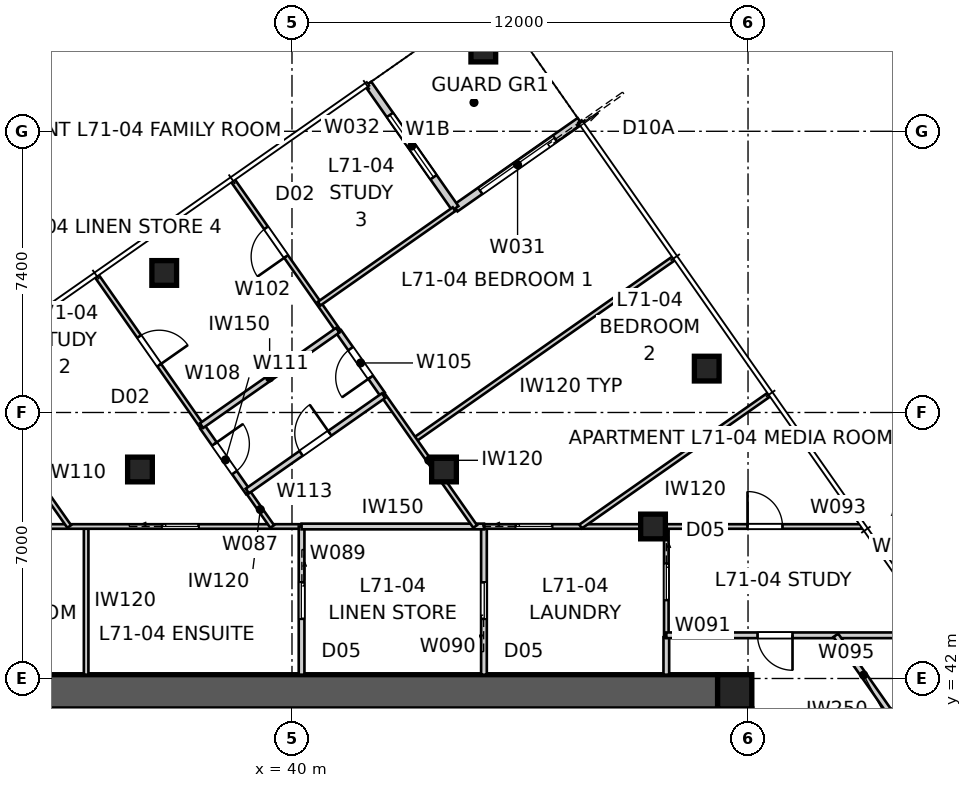
"""IFC4 building model, lengths in metres.
Left out: names, types, materials, properties, quantities, classifications, styles, units other than length and angle.
Written with IfcOpenShell. Run it as: python <this file> out.ifc"""

import sys

from ifc_helpers import new_model, si_unit, direction, frame, frame_2d, origin, origin_2d, place, context, subcontext, project, spatial, polyline, rectangle, outline, extrude, element, fill, save


model = new_model("IFC4")
c1 = context("Model", 3, precision=1e-05, world=origin(), true_north=direction((0.0, 1.0)))
c2 = subcontext(c1, "Body", "Model", "MODEL_VIEW")
j1 = project(units=[si_unit("LENGTHUNIT", "METRE"), si_unit("PLANEANGLEUNIT", "RADIAN")], contexts=[c1])
p1 = place(None, origin())
s1 = spatial("IfcSite", under=j1, at=p1, CompositionType="ELEMENT")
p2 = place(p1, origin())
s2 = spatial("IfcBuilding", under=s1, at=p2, CompositionType="ELEMENT")
p3 = place(p2, frame((0.0, 0.0, 257.4)))
s3 = spatial("IfcBuildingStorey", under=s2, at=p3, CompositionType="ELEMENT", Elevation=257.4)
p4 = place(p3, frame((28.8, 41.65, 0.0), z_axis=(0.0, 0.0, 1.0), x_axis=(1.0, 0.0, 0.0)))
e1 = element("IfcWall", 1, at=p4, inside=s3, PredefinedType="SHEAR", context=c2, shape_type="SweptSolid", body=[
    extrude(outline(polyline([(0.0, -0.45), (22.4, -0.45), (22.4, -0.025), (22.85, -0.025), (22.85, 0.025), (22.4, 0.025), (22.4, 0.45), (0.0, 0.45), (0.0, 0.025), (-0.45, 0.025), (-0.45, -0.025), (0.0, -0.025), (0.0, -0.45)])), origin(), (0.0, 0.0, 1.0), 3.4),
])
p5 = place(p3, frame((51.65, 18.8, 0.0), z_axis=(0.0, 0.0, 1.0), x_axis=(0.0, 1.0, 0.0)))
e2 = element("IfcWall", 2, at=p5, inside=s3, PredefinedType="SHEAR", context=c2, shape_type="SweptSolid", body=[
    extrude(outline(polyline([(0.0, -0.45), (22.4, -0.45), (22.4, -0.025), (22.85, -0.025), (22.85, 0.025), (22.4, 0.025), (22.4, 0.45), (0.0, 0.45), (0.0, 0.025), (-0.45, 0.025), (-0.45, -0.025), (0.0, -0.025), (0.0, -0.45)])), origin(), (0.0, 0.0, 1.0), 3.4),
])
p6 = place(p5, frame((11.14, 0.0, 0.0)))
e3 = element("IfcOpeningElement", 3, at=p6, cuts=e2, PredefinedType="OPENING", context=c2, shape_type="SweptSolid", body=[
    extrude(rectangle(XDim=1.02, YDim=2.4, at=frame_2d((0.51, 1.2))), frame((0.0, 0.46, 0.0), z_axis=(0.0, -1.0, 0.0), x_axis=(1.0, 0.0, 0.0)), (0.0, 0.0, 1.0), 0.92),
])
p7 = place(p3, frame((51.65, 41.65, 0.0), z_axis=(0.0, 0.0, 1.0), x_axis=(1.0, 0.0, 0.0)))
e4 = element("IfcColumn", 4, at=p7, inside=s3, PredefinedType="COLUMN", context=c2, shape_type="SweptSolid", body=[
    extrude(rectangle(XDim=0.9, YDim=0.9, at=origin_2d()), origin(), (0.0, 0.0, 1.0), 3.4),
])
for number, where, z_axis, x_axis in (
    (5, (50.914, 50.155, 0.0), (0.0, 0.0, 1.0), (1.0, 0.0, 0.0)),
    (6, (45.034, 58.551, 0.0), (0.0, 0.0, 1.0), (1.0, 0.0, 0.0)),
    (7, (36.638, 52.672, 0.0), (0.0, 0.0, 1.0), (1.0, 0.0, 0.0)),
    (8, (49.5, 46.0, 0.0), (0.0, 0.0, 1.0), (1.0, 0.0, 0.0)),
    (9, (44.0, 47.5, 0.0), (0.0, 0.0, 1.0), (1.0, 0.0, 0.0)),
    (10, (36.0, 47.5, 0.0), (0.0, 0.0, 1.0), (1.0, 0.0, 0.0)),
):
    element("IfcColumn", number, at=place(p3, frame(where, z_axis=z_axis, x_axis=x_axis)), inside=s3, PredefinedType="COLUMN", context=c2, shape_type="SweptSolid", body=[
        extrude(rectangle(XDim=0.65, YDim=0.65, at=origin_2d()), origin(), (0.0, 0.0, 1.0), 3.4),
    ])
p8 = place(p3, frame((47.574, 56.667, 0.0), z_axis=(0.0, 0.0, 1.0), x_axis=(-0.819165963305, -0.573556557423, 0.0)))
e11 = element("IfcWall", 11, at=p8, inside=s3, PredefinedType="SOLIDWALL", context=c2, shape_type="SweptSolid", body=[
    extrude(rectangle(XDim=4.0, YDim=0.2, at=frame_2d((2.0, 0.0))), origin(), (0.0, 0.0, 1.0), 3.25),
])
p9 = place(p8, frame((0.8, 0.0, 0.0)))
e12 = element("IfcOpeningElement", 12, at=p9, cuts=e11, PredefinedType="OPENING", context=c2, shape_type="SweptSolid", body=[
    extrude(rectangle(XDim=2.4, YDim=2.1, at=frame_2d((1.2, 1.05))), frame((0.0, 0.11, 0.0), z_axis=(0.0, -1.0, 0.0), x_axis=(1.0, 0.0, 0.0)), (0.0, 0.0, 1.0), 0.22),
])
p10 = place(p3, frame((44.298, 54.373, 0.0), z_axis=(0.0, 0.0, 1.0), x_axis=(-0.573597512525, 0.819137286189, 0.0)))
e13 = element("IfcWall", 13, at=p10, inside=s3, PredefinedType="SOLIDWALL", context=c2, shape_type="SweptSolid", body=[
    extrude(rectangle(XDim=4.0, YDim=0.2, at=frame_2d((2.0, 0.0))), origin(), (0.0, 0.0, 1.0), 3.25),
])
p11 = place(p10, frame((1.0, 0.0, 0.45)))
e14 = element("IfcOpeningElement", 14, at=p11, cuts=e13, PredefinedType="OPENING", context=c2, shape_type="SweptSolid", body=[
    extrude(rectangle(XDim=2.0, YDim=1.8, at=frame_2d((1.0, 0.9))), frame((0.0, 0.11, 0.0), z_axis=(0.0, -1.0, 0.0), x_axis=(1.0, 0.0, 0.0)), (0.0, 0.0, 1.0), 0.22),
])
p12 = place(p3, frame((57.612, 42.332, 0.0), z_axis=(0.0, 0.0, 1.0), x_axis=(-0.819161528122, -0.573562891796, 0.0)))
e15 = element("IfcWall", 15, at=p12, inside=s3, PredefinedType="PARTITIONING", context=c2, shape_type="SweptSolid", body=[
    extrude(rectangle(XDim=6.681, YDim=0.25, at=frame_2d((3.341, 0.0))), origin(), (0.0, 0.0, 1.0), 3.25),
])
p13 = place(p3, frame((34.583, 46.0, 0.0), z_axis=(0.0, 0.0, 1.0), x_axis=(0.0, -1.0, 0.0)))
e16 = element("IfcWall", 16, at=p13, inside=s3, PredefinedType="PARTITIONING", context=c2, shape_type="SweptSolid", body=[
    extrude(rectangle(XDim=3.9, YDim=0.12, at=frame_2d((1.95, 0.0))), origin(), (0.0, 0.0, 1.0), 3.25),
])
p14 = place(p3, frame((29.219, 46.0, 0.0), z_axis=(0.0, 0.0, 1.0), x_axis=(1.0, 0.0, 0.0)))
e17 = element("IfcWall", 17, at=p14, inside=s3, PredefinedType="PARTITIONING", context=c2, shape_type="SweptSolid", body=[
    extrude(rectangle(XDim=11.034, YDim=0.12, at=frame_2d((5.517, 0.0))), origin(), (0.0, 0.0, 1.0), 2.55),
])
p15 = place(p14, frame((2.01, 0.0, 0.0)))
e18 = element("IfcOpeningElement", 18, at=p15, cuts=e17, PredefinedType="OPENING", context=c2, shape_type="SweptSolid", body=[
    extrude(rectangle(XDim=0.96, YDim=2.1, at=frame_2d((0.48, 1.05))), frame((0.0, 0.07, 0.0), z_axis=(0.0, -1.0, 0.0), x_axis=(1.0, 0.0, 0.0)), (0.0, 0.0, 1.0), 0.14),
])
p16 = place(p14, frame((7.363, 0.0, 0.0)))
e19 = element("IfcOpeningElement", 19, at=p16, cuts=e17, PredefinedType="OPENING", context=c2, shape_type="SweptSolid", body=[
    extrude(rectangle(XDim=0.96, YDim=2.1, at=frame_2d((0.48, 1.05))), frame((0.0, 0.07, 0.0), z_axis=(0.0, -1.0, 0.0), x_axis=(1.0, 0.0, 0.0)), (0.0, 0.0, 1.0), 0.14),
])
p17 = place(p3, frame((40.253, 46.0, 0.0), z_axis=(0.0, 0.0, 1.0), x_axis=(0.0, -1.0, 0.0)))
e20 = element("IfcWall", 20, at=p17, inside=s3, PredefinedType="SOLIDWALL", context=c2, shape_type="SweptSolid", body=[
    extrude(rectangle(XDim=3.9, YDim=0.15, at=frame_2d((1.95, 0.0))), origin(), (0.0, 0.0, 1.0), 3.25),
])
p18 = place(p17, frame((1.47, 0.0, 0.0)))
e21 = element("IfcOpeningElement", 21, at=p18, cuts=e20, PredefinedType="OPENING", context=c2, shape_type="SweptSolid", body=[
    extrude(rectangle(XDim=0.96, YDim=2.1, at=frame_2d((0.48, 1.05))), frame((0.0, 0.085, 0.0), z_axis=(0.0, -1.0, 0.0), x_axis=(1.0, 0.0, 0.0)), (0.0, 0.0, 1.0), 0.17),
])
p19 = place(p3, frame((45.051, 42.1, 0.0), z_axis=(0.0, 0.0, 1.0), x_axis=(0.0, 1.0, 0.0)))
e22 = element("IfcWall", 22, at=p19, inside=s3, PredefinedType="SOLIDWALL", context=c2, shape_type="SweptSolid", body=[
    extrude(rectangle(XDim=3.9, YDim=0.15, at=frame_2d((1.95, 0.0))), origin(), (0.0, 0.0, 1.0), 3.25),
])
p20 = place(p19, frame((1.47, 0.0, 0.0)))
e23 = element("IfcOpeningElement", 23, at=p20, cuts=e22, PredefinedType="OPENING", context=c2, shape_type="SweptSolid", body=[
    extrude(rectangle(XDim=0.96, YDim=2.1, at=frame_2d((0.48, 1.05))), frame((0.0, 0.085, 0.0), z_axis=(0.0, -1.0, 0.0), x_axis=(1.0, 0.0, 0.0)), (0.0, 0.0, 1.0), 0.17),
])
p21 = place(p3, frame((49.85, 46.0, 0.0), z_axis=(0.0, 0.0, 1.0), x_axis=(0.0, -1.0, 0.0)))
e24 = element("IfcWall", 24, at=p21, inside=s3, PredefinedType="PARTITIONING", context=c2, shape_type="SweptSolid", body=[
    extrude(rectangle(XDim=2.913, YDim=0.12, at=frame_2d((1.457, 0.0))), origin(), (0.0, 0.0, 1.0), 3.25),
])
p22 = place(p21, frame((0.977, 0.0, 0.0)))
e25 = element("IfcOpeningElement", 25, at=p22, cuts=e24, PredefinedType="OPENING", context=c2, shape_type="SweptSolid", body=[
    extrude(rectangle(XDim=0.96, YDim=2.1, at=frame_2d((0.48, 1.05))), frame((0.0, 0.07, 0.0), z_axis=(0.0, -1.0, 0.0), x_axis=(1.0, 0.0, 0.0)), (0.0, 0.0, 1.0), 0.14),
])
p23 = place(p3, frame((49.85, 43.087, 0.0), z_axis=(0.0, 0.0, 1.0), x_axis=(0.0, -1.0, 0.0)))
e26 = element("IfcWall", 26, at=p23, inside=s3, PredefinedType="SOLIDWALL", context=c2, shape_type="SweptSolid", body=[
    extrude(rectangle(XDim=0.987, YDim=0.15, at=frame_2d((0.493, 0.0))), origin(), (0.0, 0.0, 1.0), 3.25),
])
p24 = place(p3, frame((45.051, 46.0, 0.0), z_axis=(0.0, 0.0, 1.0), x_axis=(1.0, 0.0, 0.0)))
e27 = element("IfcWall", 27, at=p24, inside=s3, PredefinedType="PARTITIONING", context=c2, shape_type="SweptSolid", body=[
    extrude(rectangle(XDim=9.943, YDim=0.12, at=frame_2d((4.972, 0.0))), origin(), (0.0, 0.0, 1.0), 2.55),
])
p25 = place(p24, frame((0.835, 0.0, 0.0)))
e28 = element("IfcOpeningElement", 28, at=p25, cuts=e27, PredefinedType="OPENING", context=c2, shape_type="SweptSolid", body=[
    extrude(rectangle(XDim=0.96, YDim=2.1, at=frame_2d((0.48, 1.05))), frame((0.0, 0.07, 0.0), z_axis=(0.0, -1.0, 0.0), x_axis=(1.0, 0.0, 0.0)), (0.0, 0.0, 1.0), 0.14),
])
p26 = place(p24, frame((6.935, 0.0, 0.0)))
e29 = element("IfcOpeningElement", 29, at=p26, cuts=e27, PredefinedType="OPENING", context=c2, shape_type="SweptSolid", body=[
    extrude(rectangle(XDim=0.92, YDim=2.34, at=frame_2d((0.46, 1.17))), frame((0.0, 0.07, 0.0), z_axis=(0.0, -1.0, 0.0), x_axis=(1.0, 0.0, 0.0)), (0.0, 0.0, 1.0), 0.14),
])
p27 = place(p3, frame((40.253, 46.0, 0.0), z_axis=(0.0, 0.0, 1.0), x_axis=(1.0, 0.0, 0.0)))
e30 = element("IfcWall", 30, at=p27, inside=s3, PredefinedType="SOLIDWALL", context=c2, shape_type="SweptSolid", body=[
    extrude(rectangle(XDim=4.799, YDim=0.15, at=frame_2d((2.399, 0.0))), origin(), (0.0, 0.0, 1.0), 3.25),
])
p28 = place(p3, frame((56.0, 43.137, 0.0), z_axis=(0.0, 0.0, 1.0), x_axis=(-1.0, 0.0, 0.0)))
e31 = element("IfcWall", 31, at=p28, inside=s3, PredefinedType="SOLIDWALL", context=c2, shape_type="SweptSolid", body=[
    extrude(rectangle(XDim=6.15, YDim=0.15, at=frame_2d((3.075, 0.0))), origin(), (0.0, 0.0, 1.0), 3.25),
])
p29 = place(p28, frame((2.829, 0.0, 0.0)))
e32 = element("IfcOpeningElement", 32, at=p29, cuts=e31, PredefinedType="OPENING", context=c2, shape_type="SweptSolid", body=[
    extrude(rectangle(XDim=0.92, YDim=2.1, at=frame_2d((0.46, 1.05))), frame((0.0, 0.085, 0.0), z_axis=(0.0, -1.0, 0.0), x_axis=(1.0, 0.0, 0.0)), (0.0, 0.0, 1.0), 0.17),
])
p30 = place(p3, frame((54.31, 43.137, 0.0), z_axis=(0.0, 0.0, 1.0), x_axis=(0.573513690046, -0.819195976144, 0.0)))
e33 = element("IfcWall", 33, at=p30, inside=s3, PredefinedType="SOLIDWALL", context=c2, shape_type="SweptSolid", body=[
    extrude(rectangle(XDim=2.553, YDim=0.15, at=frame_2d((1.276, 0.0))), origin(), (0.0, 0.0, 1.0), 3.25),
])
p31 = place(p3, frame((50.051, 53.06, 0.0), z_axis=(0.0, 0.0, 1.0), x_axis=(-0.819152099525, -0.573576357466, 0.0)))
e34 = element("IfcWall", 34, at=p31, inside=s3, PredefinedType="PARTITIONING", context=c2, shape_type="SweptSolid", body=[
    extrude(rectangle(XDim=8.335, YDim=0.12, at=frame_2d((4.167, 0.0))), origin(), (0.0, 0.0, 1.0), 3.25),
])
p32 = place(p3, frame((41.232, 51.123, 0.0), z_axis=(0.0, 0.0, 1.0), x_axis=(-0.573586984922, 0.819144657999, 0.0)))
e35 = element("IfcWall", 35, at=p32, inside=s3, PredefinedType="PARTITIONING", context=c2, shape_type="SweptSolid", body=[
    extrude(rectangle(XDim=4.864, YDim=0.12, at=frame_2d((2.432, 0.0))), origin(), (0.0, 0.0, 1.0), 3.25),
])
p33 = place(p32, frame((2.419, 0.0, 0.0)))
e36 = element("IfcOpeningElement", 36, at=p33, cuts=e35, PredefinedType="OPENING", context=c2, shape_type="SweptSolid", body=[
    extrude(rectangle(XDim=0.92, YDim=2.34, at=frame_2d((0.46, 1.17))), frame((0.0, 0.07, 0.0), z_axis=(0.0, -1.0, 0.0), x_axis=(1.0, 0.0, 0.0)), (0.0, 0.0, 1.0), 0.14),
])
p34 = place(p3, frame((44.819, 46.0, 0.0), z_axis=(0.0, 0.0, 1.0), x_axis=(-0.573566368211, 0.819159093985, 0.0)))
e37 = element("IfcWall", 37, at=p34, inside=s3, PredefinedType="PARTITIONING", context=c2, shape_type="SweptSolid", body=[
    extrude(rectangle(XDim=4.253, YDim=0.12, at=frame_2d((2.126, 0.0))), origin(), (0.0, 0.0, 1.0), 3.25),
])
p35 = place(p3, frame((40.714, 51.863, 0.0), z_axis=(0.0, 0.0, 1.0), x_axis=(0.819139307094, 0.573594626521, 0.0)))
e38 = element("IfcWall", 38, at=p35, inside=s3, PredefinedType="PARTITIONING", context=c2, shape_type="SweptSolid", body=[
    extrude(rectangle(XDim=4.335, YDim=0.12, at=frame_2d((2.167, 0.0))), origin(), (0.0, 0.0, 1.0), 3.25),
])
p36 = place(p3, frame((42.38, 49.484, 0.0), z_axis=(0.0, 0.0, 1.0), x_axis=(-0.573585144111, 0.819145946981, 0.0)))
e39 = element("IfcWall", 39, at=p36, inside=s3, PredefinedType="SOLIDWALL", context=c2, shape_type="SweptSolid", body=[
    extrude(rectangle(XDim=2.001, YDim=0.15, at=frame_2d((1.001, 0.0))), origin(), (0.0, 0.0, 1.0), 3.25),
])
p37 = place(p36, frame((0.541, 0.0, 0.0)))
e40 = element("IfcOpeningElement", 40, at=p37, cuts=e39, PredefinedType="OPENING", context=c2, shape_type="SweptSolid", body=[
    extrude(rectangle(XDim=0.92, YDim=2.34, at=frame_2d((0.46, 1.17))), frame((0.0, 0.085, 0.0), z_axis=(0.0, -1.0, 0.0), x_axis=(1.0, 0.0, 0.0)), (0.0, 0.0, 1.0), 0.17),
])
p38 = place(p3, frame((52.56, 49.477, 0.0), z_axis=(0.0, 0.0, 1.0), x_axis=(-0.81915432861, -0.573573173989, 0.0)))
e41 = element("IfcWall", 41, at=p38, inside=s3, PredefinedType="PARTITIONING", context=c2, shape_type="SweptSolid", body=[
    extrude(rectangle(XDim=6.061, YDim=0.12, at=frame_2d((3.031, 0.0))), origin(), (0.0, 0.0, 1.0), 3.25),
])
p39 = place(p3, frame((34.859, 52.598, 0.0), z_axis=(0.0, 0.0, 1.0), x_axis=(0.573586984922, -0.819144657999, 0.0)))
e42 = element("IfcWall", 42, at=p39, inside=s3, PredefinedType="PARTITIONING", context=c2, shape_type="SweptSolid", body=[
    extrude(rectangle(XDim=4.864, YDim=0.12, at=frame_2d((2.432, 0.0))), origin(), (0.0, 0.0, 1.0), 3.25),
])
p40 = place(p39, frame((1.952, 0.0, 0.0)))
e43 = element("IfcOpeningElement", 43, at=p40, cuts=e42, PredefinedType="OPENING", context=c2, shape_type="SweptSolid", body=[
    extrude(rectangle(XDim=0.92, YDim=2.34, at=frame_2d((0.46, 1.17))), frame((0.0, 0.07, 0.0), z_axis=(0.0, -1.0, 0.0), x_axis=(1.0, 0.0, 0.0)), (0.0, 0.0, 1.0), 0.14),
])
p41 = place(p3, frame((38.854, 46.892, 0.0), z_axis=(0.0, 0.0, 1.0), x_axis=(0.57368792347, -0.81907396886, 0.0)))
e44 = element("IfcWall", 44, at=p41, inside=s3, PredefinedType="PARTITIONING", context=c2, shape_type="SweptSolid", body=[
    extrude(rectangle(XDim=1.089, YDim=0.12, at=frame_2d((0.545, 0.0))), origin(), (0.0, 0.0, 1.0), 3.25),
])
p42 = place(p3, frame((34.138, 46.0, 0.0), z_axis=(0.0, 0.0, 1.0), x_axis=(-0.57358708951, 0.819144584763, 0.0)))
e45 = element("IfcWall", 45, at=p42, inside=s3, PredefinedType="PARTITIONING", context=c2, shape_type="SweptSolid", body=[
    extrude(rectangle(XDim=4.991, YDim=0.12, at=frame_2d((2.496, 0.0))), origin(), (0.0, 0.0, 1.0), 3.25),
])
p43 = place(p42, frame((2.055, 0.0, 0.0)))
e46 = element("IfcOpeningElement", 46, at=p43, cuts=e45, PredefinedType="OPENING", context=c2, shape_type="SweptSolid", body=[
    extrude(rectangle(XDim=0.92, YDim=2.34, at=frame_2d((0.46, 1.17))), frame((0.0, 0.07, 0.0), z_axis=(0.0, -1.0, 0.0), x_axis=(1.0, 0.0, 0.0)), (0.0, 0.0, 1.0), 0.14),
])
p44 = place(p3, frame((37.648, 48.614, 0.0), z_axis=(0.0, 0.0, 1.0), x_axis=(0.573485736943, -0.819215545216, 0.0)))
e47 = element("IfcWall", 47, at=p44, inside=s3, PredefinedType="SOLIDWALL", context=c2, shape_type="SweptSolid", body=[
    extrude(rectangle(XDim=2.101, YDim=0.15, at=frame_2d((1.051, 0.0))), origin(), (0.0, 0.0, 1.0), 3.25),
])
p45 = place(p44, frame((0.541, 0.0, 0.0)))
e48 = element("IfcOpeningElement", 48, at=p45, cuts=e47, PredefinedType="OPENING", context=c2, shape_type="SweptSolid", body=[
    extrude(rectangle(XDim=0.92, YDim=2.34, at=frame_2d((0.46, 1.17))), frame((0.0, 0.085, 0.0), z_axis=(0.0, -1.0, 0.0), x_axis=(1.0, 0.0, 0.0)), (0.0, 0.0, 1.0), 0.17),
])
p46 = place(p3, frame((41.203, 51.164, 0.0), z_axis=(0.0, 0.0, 1.0), x_axis=(-0.81916112811, -0.573563463091, 0.0)))
e49 = element("IfcWall", 49, at=p46, inside=s3, PredefinedType="SOLIDWALL", context=c2, shape_type="SweptSolid", body=[
    extrude(rectangle(XDim=4.375, YDim=0.15, at=frame_2d((2.188, 0.0))), origin(), (0.0, 0.0, 1.0), 3.25),
])
p47 = place(p3, frame((38.825, 46.933, 0.0), z_axis=(0.0, 0.0, 1.0), x_axis=(0.81916112811, 0.573563463091, 0.0)))
e50 = element("IfcWall", 50, at=p47, inside=s3, PredefinedType="SOLIDWALL", context=c2, shape_type="SweptSolid", body=[
    extrude(rectangle(XDim=4.375, YDim=0.15, at=frame_2d((2.188, 0.0))), origin(), (0.0, 0.0, 1.0), 3.25),
])
p48 = place(p47, frame((1.728, 0.0, 0.0)))
e51 = element("IfcOpeningElement", 51, at=p48, cuts=e50, PredefinedType="OPENING", context=c2, shape_type="SweptSolid", body=[
    extrude(rectangle(XDim=0.92, YDim=2.34, at=frame_2d((0.46, 1.17))), frame((0.0, 0.085, 0.0), z_axis=(0.0, -1.0, 0.0), x_axis=(1.0, 0.0, 0.0)), (0.0, 0.0, 1.0), 0.17),
])
p49 = place(p9, origin())
e52 = element("IfcDoor", 52, at=p49, inside=s3, OperationType="SLIDING_TO_LEFT", PredefinedType="DOOR", context=c2, shape_type="SweptSolid", body=[
    extrude(rectangle(XDim=2.4, YDim=2.1, at=frame_2d((1.2, 1.05))), frame((0.0, 0.025, 0.0), z_axis=(0.0, -1.0, 0.0), x_axis=(1.0, 0.0, 0.0)), (0.0, 0.0, 1.0), 0.05),
])
fill(e12, e52)
p50 = place(p11, origin())
e53 = element("IfcWindow", 53, at=p50, inside=s3, PartitioningType="SINGLE_PANEL", PredefinedType="WINDOW", context=c2, shape_type="SweptSolid", body=[
    extrude(rectangle(XDim=2.0, YDim=1.8, at=frame_2d((1.0, 0.9))), frame((0.0, 0.03, 0.0), z_axis=(0.0, -1.0, 0.0), x_axis=(1.0, 0.0, 0.0)), (0.0, 0.0, 1.0), 0.06),
])
fill(e14, e53)
p51 = place(p16, origin())
e54 = element("IfcDoor", 54, at=p51, inside=s3, OperationType="SLIDING_TO_LEFT", PredefinedType="DOOR", context=c2, shape_type="SweptSolid", body=[
    extrude(rectangle(XDim=0.96, YDim=2.1, at=frame_2d((0.48, 1.05))), frame((0.0, 0.025, 0.0), z_axis=(0.0, -1.0, 0.0), x_axis=(1.0, 0.0, 0.0)), (0.0, 0.0, 1.0), 0.05),
])
fill(e19, e54)
p52 = place(p40, origin())
e55 = element("IfcDoor", 55, at=p52, inside=s3, OperationType="SINGLE_SWING_RIGHT", PredefinedType="DOOR", context=c2, shape_type="SweptSolid", body=[
    extrude(rectangle(XDim=0.92, YDim=2.34, at=frame_2d((0.46, 1.17))), frame((0.0, 0.025, 0.0), z_axis=(0.0, -1.0, 0.0), x_axis=(1.0, 0.0, 0.0)), (0.0, 0.0, 1.0), 0.05),
])
fill(e43, e55)
p53 = place(p45, origin())
e56 = element("IfcDoor", 56, at=p53, inside=s3, OperationType="SINGLE_SWING_LEFT", PredefinedType="DOOR", context=c2, shape_type="SweptSolid", body=[
    extrude(rectangle(XDim=0.92, YDim=2.34, at=frame_2d((0.46, 1.17))), frame((0.0, 0.025, 0.0), z_axis=(0.0, -1.0, 0.0), x_axis=(1.0, 0.0, 0.0)), (0.0, 0.0, 1.0), 0.05),
])
fill(e48, e56)
p54 = place(p18, origin())
e57 = element("IfcDoor", 57, at=p54, inside=s3, OperationType="SLIDING_TO_LEFT", PredefinedType="DOOR", context=c2, shape_type="SweptSolid", body=[
    extrude(rectangle(XDim=0.96, YDim=2.1, at=frame_2d((0.48, 1.05))), frame((0.0, 0.025, 0.0), z_axis=(0.0, -1.0, 0.0), x_axis=(1.0, 0.0, 0.0)), (0.0, 0.0, 1.0), 0.05),
])
fill(e21, e57)
p55 = place(p33, origin())
e58 = element("IfcDoor", 58, at=p55, inside=s3, OperationType="SINGLE_SWING_LEFT", PredefinedType="DOOR", context=c2, shape_type="SweptSolid", body=[
    extrude(rectangle(XDim=0.92, YDim=2.34, at=frame_2d((0.46, 1.17))), frame((0.0, 0.025, 0.0), z_axis=(0.0, -1.0, 0.0), x_axis=(1.0, 0.0, 0.0)), (0.0, 0.0, 1.0), 0.05),
])
fill(e36, e58)
p56 = place(p48, origin())
e59 = element("IfcDoor", 59, at=p56, inside=s3, OperationType="SINGLE_SWING_RIGHT", PredefinedType="DOOR", context=c2, shape_type="SweptSolid", body=[
    extrude(rectangle(XDim=0.92, YDim=2.34, at=frame_2d((0.46, 1.17))), frame((0.0, 0.025, 0.0), z_axis=(0.0, -1.0, 0.0), x_axis=(1.0, 0.0, 0.0)), (0.0, 0.0, 1.0), 0.05),
])
fill(e51, e59)
p57 = place(p37, origin())
e60 = element("IfcDoor", 60, at=p57, inside=s3, OperationType="SINGLE_SWING_LEFT", PredefinedType="DOOR", context=c2, shape_type="SweptSolid", body=[
    extrude(rectangle(XDim=0.92, YDim=2.34, at=frame_2d((0.46, 1.17))), frame((0.0, 0.025, 0.0), z_axis=(0.0, -1.0, 0.0), x_axis=(1.0, 0.0, 0.0)), (0.0, 0.0, 1.0), 0.05),
])
fill(e40, e60)
p58 = place(p20, origin())
e61 = element("IfcDoor", 61, at=p58, inside=s3, OperationType="SLIDING_TO_LEFT", PredefinedType="DOOR", context=c2, shape_type="SweptSolid", body=[
    extrude(rectangle(XDim=0.96, YDim=2.1, at=frame_2d((0.48, 1.05))), frame((0.0, 0.025, 0.0), z_axis=(0.0, -1.0, 0.0), x_axis=(1.0, 0.0, 0.0)), (0.0, 0.0, 1.0), 0.05),
])
fill(e23, e61)
p59 = place(p22, origin())
e62 = element("IfcDoor", 62, at=p59, inside=s3, OperationType="SLIDING_TO_LEFT", PredefinedType="DOOR", context=c2, shape_type="SweptSolid", body=[
    extrude(rectangle(XDim=0.96, YDim=2.1, at=frame_2d((0.48, 1.05))), frame((0.0, 0.025, 0.0), z_axis=(0.0, -1.0, 0.0), x_axis=(1.0, 0.0, 0.0)), (0.0, 0.0, 1.0), 0.05),
])
fill(e25, e62)
p60 = place(p25, origin())
e63 = element("IfcDoor", 63, at=p60, inside=s3, OperationType="SLIDING_TO_LEFT", PredefinedType="DOOR", context=c2, shape_type="SweptSolid", body=[
    extrude(rectangle(XDim=0.96, YDim=2.1, at=frame_2d((0.48, 1.05))), frame((0.0, 0.025, 0.0), z_axis=(0.0, -1.0, 0.0), x_axis=(1.0, 0.0, 0.0)), (0.0, 0.0, 1.0), 0.05),
])
fill(e28, e63)
p61 = place(p26, origin())
e64 = element("IfcDoor", 64, at=p61, inside=s3, OperationType="SINGLE_SWING_LEFT", PredefinedType="DOOR", context=c2, shape_type="SweptSolid", body=[
    extrude(rectangle(XDim=0.92, YDim=2.34, at=frame_2d((0.46, 1.17))), frame((0.0, 0.025, 0.0), z_axis=(0.0, -1.0, 0.0), x_axis=(1.0, 0.0, 0.0)), (0.0, 0.0, 1.0), 0.05),
])
fill(e29, e64)
p62 = place(p29, origin())
e65 = element("IfcDoor", 65, at=p62, inside=s3, OperationType="SINGLE_SWING_LEFT", PredefinedType="DOOR", context=c2, shape_type="SweptSolid", body=[
    extrude(rectangle(XDim=0.92, YDim=2.1, at=frame_2d((0.46, 1.05))), frame((0.0, 0.025, 0.0), z_axis=(0.0, -1.0, 0.0), x_axis=(1.0, 0.0, 0.0)), (0.0, 0.0, 1.0), 0.05),
])
fill(e32, e65)
save(model, sys.argv[1])
